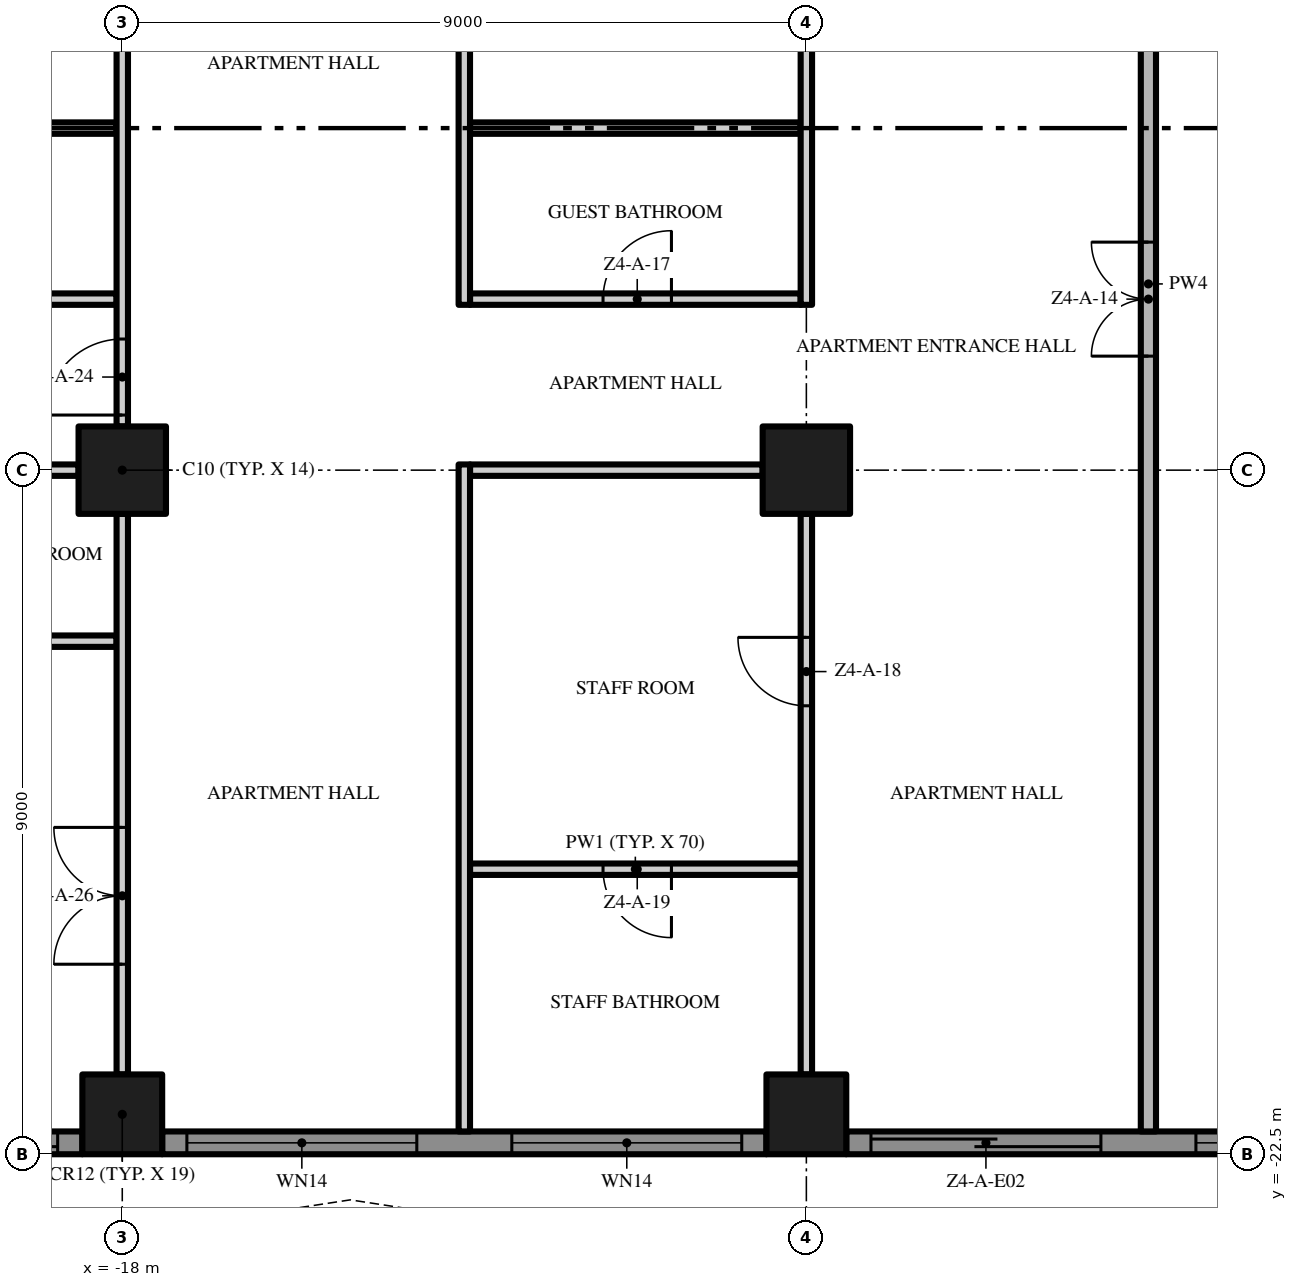
"""IFC4 building model, lengths in metres.
Left out: names, types, materials, properties, quantities, classifications, styles, units other than length and angle.
Written with IfcOpenShell. Run it as: python <this file> out.ifc"""

import sys

from ifc_helpers import new_model, si_unit, direction, frame, frame_2d, origin, origin_2d, place, context, subcontext, project, spatial, polyline, rectangle, outline, extrude, element, fill, save


model = new_model("IFC4")
c1 = context("Model", 3, precision=1e-05, world=origin(), true_north=direction((0.0, 1.0)))
c2 = subcontext(c1, "Body", "Model", "MODEL_VIEW")
j1 = project(units=[si_unit("LENGTHUNIT", "METRE"), si_unit("PLANEANGLEUNIT", "RADIAN")], contexts=[c1])
p1 = place(None, origin())
s1 = spatial("IfcSite", under=j1, at=p1, CompositionType="ELEMENT")
p2 = place(p1, origin())
s2 = spatial("IfcBuilding", under=s1, at=p2, CompositionType="ELEMENT")
p3 = place(p2, frame((0.0, 0.0, 188.2)))
s3 = spatial("IfcBuildingStorey", under=s2, at=p3, CompositionType="ELEMENT", Elevation=188.2)
p4 = place(p3, frame((-18.0, -13.5, 0.0), z_axis=(0.0, 0.0, 1.0), x_axis=(1.0, 0.0, 0.0)))
e1 = element("IfcColumn", 1, at=p4, inside=s3, PredefinedType="COLUMN", context=c2, shape_type="SweptSolid", body=[
    extrude(rectangle(XDim=1.15, YDim=1.15, at=origin_2d()), origin(), (0.0, 0.0, 1.0), 3.5),
])
p5 = place(p3, frame((-18.0, -21.975, 0.0), z_axis=(0.0, 0.0, 1.0), x_axis=(1.0, 0.0, 0.0)))
e2 = element("IfcColumn", 2, at=p5, inside=s3, PredefinedType="COLUMN", context=c2, shape_type="SweptSolid", body=[
    extrude(rectangle(XDim=1.05, YDim=1.05, at=origin_2d()), origin(), (0.0, 0.0, 1.0), 3.5),
])
p6 = place(p3, frame((-9.0, -13.5, 0.0), z_axis=(0.0, 0.0, 1.0), x_axis=(1.0, 0.0, 0.0)))
e3 = element("IfcColumn", 3, at=p6, inside=s3, PredefinedType="COLUMN", context=c2, shape_type="SweptSolid", body=[
    extrude(rectangle(XDim=1.15, YDim=1.15, at=origin_2d()), origin(), (0.0, 0.0, 1.0), 3.5),
])
p7 = place(p3, frame((-9.0, -21.975, 0.0), z_axis=(0.0, 0.0, 1.0), x_axis=(1.0, 0.0, 0.0)))
e4 = element("IfcColumn", 4, at=p7, inside=s3, PredefinedType="COLUMN", context=c2, shape_type="SweptSolid", body=[
    extrude(rectangle(XDim=1.05, YDim=1.05, at=origin_2d()), origin(), (0.0, 0.0, 1.0), 3.5),
])
p8 = place(p3, frame((-18.525, -22.35, 0.0), z_axis=(0.0, 0.0, 1.0), x_axis=(-1.0, 0.0, 0.0)))
e5 = element("IfcWall", 5, at=p8, inside=s3, PredefinedType="SOLIDWALL", context=c2, shape_type="SweptSolid", body=[
    extrude(rectangle(XDim=3.675, YDim=0.3, at=frame_2d((1.837, 0.0))), origin(), (0.0, 0.0, 1.0), 3.5),
])
p9 = place(p8, frame((0.325, 0.0, 0.0)))
e6 = element("IfcOpeningElement", 6, at=p9, cuts=e5, PredefinedType="OPENING", context=c2, shape_type="SweptSolid", body=[
    extrude(rectangle(XDim=3.025, YDim=2.4, at=frame_2d((1.512, 1.2))), frame((0.0, 0.16, 0.0), z_axis=(0.0, -1.0, 0.0), x_axis=(1.0, 0.0, 0.0)), (0.0, 0.0, 1.0), 0.32),
])
p10 = place(p3, frame((-9.525, -22.35, 0.0), z_axis=(0.0, 0.0, 1.0), x_axis=(-1.0, 0.0, 0.0)))
e7 = element("IfcWall", 7, at=p10, inside=s3, PredefinedType="SOLIDWALL", context=c2, shape_type="SweptSolid", body=[
    extrude(rectangle(XDim=7.95, YDim=0.3, at=frame_2d((3.975, 0.0))), origin(), (0.0, 0.0, 1.0), 3.5),
])
p11 = place(p10, frame((4.6, 0.0, 0.45)))
e8 = element("IfcOpeningElement", 8, at=p11, cuts=e7, PredefinedType="OPENING", context=c2, shape_type="SweptSolid", body=[
    extrude(rectangle(XDim=3.025, YDim=2.65, at=frame_2d((1.512, 1.325))), frame((0.0, 0.16, 0.0), z_axis=(0.0, -1.0, 0.0), x_axis=(1.0, 0.0, 0.0)), (0.0, 0.0, 1.0), 0.32),
])
p12 = place(p10, frame((0.325, 0.0, 0.45)))
e9 = element("IfcOpeningElement", 9, at=p12, cuts=e7, PredefinedType="OPENING", context=c2, shape_type="SweptSolid", body=[
    extrude(rectangle(XDim=3.025, YDim=2.65, at=frame_2d((1.512, 1.325))), frame((0.0, 0.16, 0.0), z_axis=(0.0, -1.0, 0.0), x_axis=(1.0, 0.0, 0.0)), (0.0, 0.0, 1.0), 0.32),
])
p13 = place(p3, frame((-0.525, -22.35, 0.0), z_axis=(0.0, 0.0, 1.0), x_axis=(-1.0, 0.0, 0.0)))
e10 = element("IfcWall", 10, at=p13, inside=s3, PredefinedType="SOLIDWALL", context=c2, shape_type="SweptSolid", body=[
    extrude(rectangle(XDim=7.95, YDim=0.3, at=frame_2d((3.975, 0.0))), origin(), (0.0, 0.0, 1.0), 3.5),
])
p14 = place(p13, frame((4.6, 0.0, 0.0)))
e11 = element("IfcOpeningElement", 11, at=p14, cuts=e10, PredefinedType="OPENING", context=c2, shape_type="SweptSolid", body=[
    extrude(rectangle(XDim=3.025, YDim=2.4, at=frame_2d((1.512, 1.2))), frame((0.0, 0.16, 0.0), z_axis=(0.0, -1.0, 0.0), x_axis=(1.0, 0.0, 0.0)), (0.0, 0.0, 1.0), 0.32),
])
p15 = place(p13, frame((0.325, 0.0, 0.45)))
e12 = element("IfcOpeningElement", 12, at=p15, cuts=e10, PredefinedType="OPENING", context=c2, shape_type="SweptSolid", body=[
    extrude(rectangle(XDim=3.025, YDim=2.65, at=frame_2d((1.512, 1.325))), frame((0.0, 0.16, 0.0), z_axis=(0.0, -1.0, 0.0), x_axis=(1.0, 0.0, 0.0)), (0.0, 0.0, 1.0), 0.32),
])
p16 = place(p3, origin())
e13 = element("IfcWall", 13, at=p16, inside=s3, PredefinedType="USERDEFINED", context=c2, shape_type="SweptSolid", body=[
    extrude(outline(polyline([(-22.5, -25.5), (-21.0, -25.271), (-19.5, -24.671), (-18.0, -23.929), (-16.5, -23.329), (-15.0, -23.1), (-13.5, -23.329), (-12.0, -23.929), (-10.5, -24.671), (-9.0, -25.271), (-7.5, -25.5), (-6.0, -25.271), (-4.5, -24.671), (-3.0, -23.929), (-1.5, -23.329), (0.0, -23.1), (1.5, -23.329), (3.0, -23.929), (4.5, -24.671), (6.0, -25.271), (7.5, -25.5), (9.0, -25.271), (10.5, -24.671), (12.0, -23.929), (13.5, -23.329), (15.0, -23.1), (16.5, -23.329), (18.0, -23.929), (19.5, -24.671), (21.0, -25.271), (22.5, -25.5), (22.538, -25.253), (21.066, -25.028), (19.602, -24.442), (18.102, -23.701), (16.566, -23.086), (15.0, -22.847), (13.434, -23.086), (11.898, -23.701), (10.398, -24.442), (8.934, -25.028), (7.5, -25.247), (6.066, -25.028), (4.602, -24.442), (3.102, -23.701), (1.566, -23.086), (0.0, -22.847), (-1.566, -23.086), (-3.102, -23.701), (-4.602, -24.442), (-6.066, -25.028), (-7.5, -25.247), (-8.934, -25.028), (-10.398, -24.442), (-11.898, -23.701), (-13.434, -23.086), (-15.0, -22.847), (-16.566, -23.086), (-18.102, -23.701), (-19.602, -24.442), (-21.066, -25.028), (-22.538, -25.253), (-22.5, -25.5)])), origin(), (0.0, 0.0, 1.0), 0.9),
])
p17 = place(p3, frame((-9.075, -18.75, 0.0), z_axis=(0.0, 0.0, 1.0), x_axis=(-1.0, 0.0, 0.0)))
e14 = element("IfcWall", 14, at=p17, inside=s3, PredefinedType="PARTITIONING", context=c2, shape_type="SweptSolid", body=[
    extrude(rectangle(XDim=4.35, YDim=0.15, at=frame_2d((2.175, 0.0))), origin(), (0.0, 0.0, 1.0), 3.5),
])
p18 = place(p17, frame((1.7, 0.0, 0.0)))
e15 = element("IfcOpeningElement", 15, at=p18, cuts=e14, PredefinedType="OPENING", context=c2, shape_type="SweptSolid", body=[
    extrude(rectangle(XDim=0.9, YDim=2.1, at=frame_2d((0.45, 1.05))), frame((0.0, 0.085, 0.0), z_axis=(0.0, -1.0, 0.0), x_axis=(1.0, 0.0, 0.0)), (0.0, 0.0, 1.0), 0.17),
])
p19 = place(p3, frame((-20.925, -15.75, 0.0), z_axis=(0.0, 0.0, 1.0), x_axis=(1.0, 0.0, 0.0)))
e16 = element("IfcWall", 16, at=p19, inside=s3, PredefinedType="PARTITIONING", context=c2, shape_type="SweptSolid", body=[
    extrude(rectangle(XDim=2.85, YDim=0.15, at=frame_2d((1.425, 0.0))), origin(), (0.0, 0.0, 1.0), 3.5),
])
p20 = place(p3, frame((-25.95, -13.5, 0.0), z_axis=(0.0, 0.0, 1.0), x_axis=(1.0, 0.0, 0.0)))
e17 = element("IfcWall", 17, at=p20, inside=s3, PredefinedType="PARTITIONING", context=c2, shape_type="SweptSolid", body=[
    extrude(rectangle(XDim=7.375, YDim=0.15, at=frame_2d((3.688, 0.0))), origin(), (0.0, 0.0, 1.0), 3.5),
])
p21 = place(p3, frame((-13.425, -13.5, 0.0), z_axis=(0.0, 0.0, 1.0), x_axis=(1.0, 0.0, 0.0)))
e18 = element("IfcWall", 18, at=p21, inside=s3, PredefinedType="PARTITIONING", context=c2, shape_type="SweptSolid", body=[
    extrude(rectangle(XDim=3.85, YDim=0.15, at=frame_2d((1.925, 0.0))), origin(), (0.0, 0.0, 1.0), 3.5),
])
p22 = place(p3, frame((-20.925, -11.25, 0.0), z_axis=(0.0, 0.0, 1.0), x_axis=(1.0, 0.0, 0.0)))
e19 = element("IfcWall", 19, at=p22, inside=s3, PredefinedType="PARTITIONING", context=c2, shape_type="SweptSolid", body=[
    extrude(rectangle(XDim=2.85, YDim=0.15, at=frame_2d((1.425, 0.0))), origin(), (0.0, 0.0, 1.0), 3.5),
])
p23 = place(p3, frame((-13.425, -11.25, 0.0), z_axis=(0.0, 0.0, 1.0), x_axis=(1.0, 0.0, 0.0)))
e20 = element("IfcWall", 20, at=p23, inside=s3, PredefinedType="PARTITIONING", context=c2, shape_type="SweptSolid", body=[
    extrude(rectangle(XDim=4.35, YDim=0.15, at=frame_2d((2.175, 0.0))), origin(), (0.0, 0.0, 1.0), 3.5),
])
p24 = place(p23, frame((1.75, 0.0, 0.0)))
e21 = element("IfcOpeningElement", 21, at=p24, cuts=e20, PredefinedType="OPENING", context=c2, shape_type="SweptSolid", body=[
    extrude(rectangle(XDim=0.9, YDim=2.1, at=frame_2d((0.45, 1.05))), frame((0.0, 0.085, 0.0), z_axis=(0.0, -1.0, 0.0), x_axis=(1.0, 0.0, 0.0)), (0.0, 0.0, 1.0), 0.17),
])
p25 = place(p3, frame((-20.925, -9.0, 0.0), z_axis=(0.0, 0.0, 1.0), x_axis=(1.0, 0.0, 0.0)))
e22 = element("IfcWall", 22, at=p25, inside=s3, PredefinedType="PARTITIONING", context=c2, shape_type="SweptSolid", body=[
    extrude(rectangle(XDim=2.85, YDim=0.15, at=frame_2d((1.425, 0.0))), origin(), (0.0, 0.0, 1.0), 3.5),
])
p26 = place(p3, frame((-13.425, -9.0, 0.0), z_axis=(0.0, 0.0, 1.0), x_axis=(1.0, 0.0, 0.0)))
e23 = element("IfcWall", 23, at=p26, inside=s3, PredefinedType="PARTITIONING", context=c2, shape_type="SweptSolid", body=[
    extrude(rectangle(XDim=4.35, YDim=0.15, at=frame_2d((2.175, 0.0))), origin(), (0.0, 0.0, 1.0), 3.5),
])
p27 = place(p3, frame((-18.0, -21.45, 0.0), z_axis=(0.0, 0.0, 1.0), x_axis=(0.0, 1.0, 0.0)))
e24 = element("IfcWall", 24, at=p27, inside=s3, PredefinedType="PARTITIONING", context=c2, shape_type="SweptSolid", body=[
    extrude(rectangle(XDim=7.375, YDim=0.15, at=frame_2d((3.688, 0.0))), origin(), (0.0, 0.0, 1.0), 3.5),
])
p28 = place(p27, frame((1.45, 0.0, 0.0)))
e25 = element("IfcOpeningElement", 25, at=p28, cuts=e24, PredefinedType="OPENING", context=c2, shape_type="SweptSolid", body=[
    extrude(rectangle(XDim=1.8, YDim=2.4, at=frame_2d((0.9, 1.2))), frame((0.0, 0.085, 0.0), z_axis=(0.0, -1.0, 0.0), x_axis=(1.0, 0.0, 0.0)), (0.0, 0.0, 1.0), 0.17),
])
p29 = place(p3, frame((-18.0, -12.925, 0.0), z_axis=(0.0, 0.0, 1.0), x_axis=(0.0, 1.0, 0.0)))
e26 = element("IfcWall", 26, at=p29, inside=s3, PredefinedType="PARTITIONING", context=c2, shape_type="SweptSolid", body=[
    extrude(rectangle(XDim=7.85, YDim=0.15, at=frame_2d((3.925, 0.0))), origin(), (0.0, 0.0, 1.0), 3.5),
])
p30 = place(p29, frame((6.7, 0.0, 0.0)))
e27 = element("IfcOpeningElement", 27, at=p30, cuts=e26, PredefinedType="OPENING", context=c2, shape_type="SweptSolid", body=[
    extrude(rectangle(XDim=1.0, YDim=2.4, at=frame_2d((0.5, 1.2))), frame((0.0, 0.085, 0.0), z_axis=(0.0, -1.0, 0.0), x_axis=(1.0, 0.0, 0.0)), (0.0, 0.0, 1.0), 0.17),
])
p31 = place(p29, frame((0.15, 0.0, 0.0)))
e28 = element("IfcOpeningElement", 28, at=p31, cuts=e26, PredefinedType="OPENING", context=c2, shape_type="SweptSolid", body=[
    extrude(rectangle(XDim=1.0, YDim=2.4, at=frame_2d((0.5, 1.2))), frame((0.0, 0.085, 0.0), z_axis=(0.0, -1.0, 0.0), x_axis=(1.0, 0.0, 0.0)), (0.0, 0.0, 1.0), 0.17),
])
p32 = place(p3, frame((-13.5, -22.2, 0.0), z_axis=(0.0, 0.0, 1.0), x_axis=(0.0, 1.0, 0.0)))
e29 = element("IfcWall", 29, at=p32, inside=s3, PredefinedType="PARTITIONING", context=c2, shape_type="SweptSolid", body=[
    extrude(rectangle(XDim=8.775, YDim=0.15, at=frame_2d((4.388, 0.0))), origin(), (0.0, 0.0, 1.0), 3.5),
])
p33 = place(p3, frame((-13.5, -11.325, 0.0), z_axis=(0.0, 0.0, 1.0), x_axis=(0.0, 1.0, 0.0)))
e30 = element("IfcWall", 30, at=p33, inside=s3, PredefinedType="PARTITIONING", context=c2, shape_type="SweptSolid", body=[
    extrude(rectangle(XDim=11.225, YDim=0.15, at=frame_2d((5.612, 0.0))), origin(), (0.0, 0.0, 1.0), 3.5),
])
p34 = place(p3, frame((-9.0, -21.45, 0.0), z_axis=(0.0, 0.0, 1.0), x_axis=(0.0, 1.0, 0.0)))
e31 = element("IfcWall", 31, at=p34, inside=s3, PredefinedType="PARTITIONING", context=c2, shape_type="SweptSolid", body=[
    extrude(rectangle(XDim=7.375, YDim=0.15, at=frame_2d((3.688, 0.0))), origin(), (0.0, 0.0, 1.0), 3.5),
])
p35 = place(p34, frame((4.85, 0.0, 0.0)))
e32 = element("IfcOpeningElement", 32, at=p35, cuts=e31, PredefinedType="OPENING", context=c2, shape_type="SweptSolid", body=[
    extrude(rectangle(XDim=0.9, YDim=2.1, at=frame_2d((0.45, 1.05))), frame((0.0, 0.085, 0.0), z_axis=(0.0, -1.0, 0.0), x_axis=(1.0, 0.0, 0.0)), (0.0, 0.0, 1.0), 0.17),
])
p36 = place(p3, frame((-9.0, -11.325, 0.0), z_axis=(0.0, 0.0, 1.0), x_axis=(0.0, 1.0, 0.0)))
e33 = element("IfcWall", 33, at=p36, inside=s3, PredefinedType="PARTITIONING", context=c2, shape_type="SweptSolid", body=[
    extrude(rectangle(XDim=6.25, YDim=0.15, at=frame_2d((3.125, 0.0))), origin(), (0.0, 0.0, 1.0), 3.5),
])
p37 = place(p36, frame((4.825, 0.0, 0.0)))
e34 = element("IfcOpeningElement", 34, at=p37, cuts=e33, PredefinedType="OPENING", context=c2, shape_type="SweptSolid", body=[
    extrude(rectangle(XDim=1.0, YDim=2.4, at=frame_2d((0.5, 1.2))), frame((0.0, 0.085, 0.0), z_axis=(0.0, -1.0, 0.0), x_axis=(1.0, 0.0, 0.0)), (0.0, 0.0, 1.0), 0.17),
])
p38 = place(p3, frame((-4.5, -22.2, 0.0), z_axis=(0.0, 0.0, 1.0), x_axis=(0.0, 1.0, 0.0)))
e35 = element("IfcWall", 35, at=p38, inside=s3, PredefinedType="PARTITIONING", context=c2, shape_type="SweptSolid", body=[
    extrude(rectangle(XDim=22.3, YDim=0.2, at=frame_2d((11.15, 0.0))), origin(), (0.0, 0.0, 1.0), 3.5),
])
p39 = place(p38, frame((10.2, 0.0, 0.0)))
e36 = element("IfcOpeningElement", 36, at=p39, cuts=e35, PredefinedType="OPENING", context=c2, shape_type="SweptSolid", body=[
    extrude(rectangle(XDim=1.5, YDim=2.4, at=frame_2d((0.75, 1.2))), frame((0.0, 0.11, 0.0), z_axis=(0.0, -1.0, 0.0), x_axis=(1.0, 0.0, 0.0)), (0.0, 0.0, 1.0), 0.22),
])
p40 = place(p9, origin())
e37 = element("IfcDoor", 37, at=p40, inside=s3, OperationType="SINGLE_SWING_LEFT", PredefinedType="DOOR", context=c2, shape_type="SweptSolid", body=[
    extrude(rectangle(XDim=3.025, YDim=2.4, at=frame_2d((1.512, 1.2))), frame((0.0, 0.025, 0.0), z_axis=(0.0, -1.0, 0.0), x_axis=(1.0, 0.0, 0.0)), (0.0, 0.0, 1.0), 0.05),
])
fill(e6, e37)
p41 = place(p11, origin())
e38 = element("IfcWindow", 38, at=p41, inside=s3, PartitioningType="SINGLE_PANEL", PredefinedType="WINDOW", context=c2, shape_type="SweptSolid", body=[
    extrude(rectangle(XDim=3.025, YDim=2.65, at=frame_2d((1.512, 1.325))), frame((0.0, 0.03, 0.0), z_axis=(0.0, -1.0, 0.0), x_axis=(1.0, 0.0, 0.0)), (0.0, 0.0, 1.0), 0.06),
])
fill(e8, e38)
p42 = place(p12, origin())
e39 = element("IfcWindow", 39, at=p42, inside=s3, PartitioningType="SINGLE_PANEL", PredefinedType="WINDOW", context=c2, shape_type="SweptSolid", body=[
    extrude(rectangle(XDim=3.025, YDim=2.65, at=frame_2d((1.512, 1.325))), frame((0.0, 0.03, 0.0), z_axis=(0.0, -1.0, 0.0), x_axis=(1.0, 0.0, 0.0)), (0.0, 0.0, 1.0), 0.06),
])
fill(e9, e39)
p43 = place(p14, origin())
e40 = element("IfcDoor", 40, at=p43, inside=s3, OperationType="SINGLE_SWING_LEFT", PredefinedType="DOOR", context=c2, shape_type="SweptSolid", body=[
    extrude(rectangle(XDim=3.025, YDim=2.4, at=frame_2d((1.512, 1.2))), frame((0.0, 0.025, 0.0), z_axis=(0.0, -1.0, 0.0), x_axis=(1.0, 0.0, 0.0)), (0.0, 0.0, 1.0), 0.05),
])
fill(e11, e40)
p44 = place(p15, origin())
e41 = element("IfcWindow", 41, at=p44, inside=s3, PartitioningType="SINGLE_PANEL", PredefinedType="WINDOW", context=c2, shape_type="SweptSolid", body=[
    extrude(rectangle(XDim=3.025, YDim=2.65, at=frame_2d((1.512, 1.325))), frame((0.0, 0.03, 0.0), z_axis=(0.0, -1.0, 0.0), x_axis=(1.0, 0.0, 0.0)), (0.0, 0.0, 1.0), 0.06),
])
fill(e12, e41)
p45 = place(p39, origin())
e42 = element("IfcDoor", 42, at=p45, inside=s3, OperationType="DOUBLE_DOOR_SINGLE_SWING", PredefinedType="DOOR", context=c2, shape_type="SweptSolid", body=[
    extrude(rectangle(XDim=1.5, YDim=2.4, at=frame_2d((0.75, 1.2))), frame((0.0, 0.025, 0.0), z_axis=(0.0, -1.0, 0.0), x_axis=(1.0, 0.0, 0.0)), (0.0, 0.0, 1.0), 0.05),
])
fill(e36, e42)
p46 = place(p24, origin())
e43 = element("IfcDoor", 43, at=p46, inside=s3, OperationType="SINGLE_SWING_RIGHT", PredefinedType="DOOR", context=c2, shape_type="SweptSolid", body=[
    extrude(rectangle(XDim=0.9, YDim=2.1, at=frame_2d((0.45, 1.05))), frame((0.0, 0.025, 0.0), z_axis=(0.0, -1.0, 0.0), x_axis=(1.0, 0.0, 0.0)), (0.0, 0.0, 1.0), 0.05),
])
fill(e21, e43)
p47 = place(p35, origin())
e44 = element("IfcDoor", 44, at=p47, inside=s3, OperationType="SINGLE_SWING_RIGHT", PredefinedType="DOOR", context=c2, shape_type="SweptSolid", body=[
    extrude(rectangle(XDim=0.9, YDim=2.1, at=frame_2d((0.45, 1.05))), frame((0.0, 0.025, 0.0), z_axis=(0.0, -1.0, 0.0), x_axis=(1.0, 0.0, 0.0)), (0.0, 0.0, 1.0), 0.05),
])
fill(e32, e44)
p48 = place(p18, origin())
e45 = element("IfcDoor", 45, at=p48, inside=s3, OperationType="SINGLE_SWING_LEFT", PredefinedType="DOOR", context=c2, shape_type="SweptSolid", body=[
    extrude(rectangle(XDim=0.9, YDim=2.1, at=frame_2d((0.45, 1.05))), frame((0.0, 0.025, 0.0), z_axis=(0.0, -1.0, 0.0), x_axis=(1.0, 0.0, 0.0)), (0.0, 0.0, 1.0), 0.05),
])
fill(e15, e45)
p49 = place(p31, origin())
e46 = element("IfcDoor", 46, at=p49, inside=s3, OperationType="SINGLE_SWING_LEFT", PredefinedType="DOOR", context=c2, shape_type="SweptSolid", body=[
    extrude(rectangle(XDim=1.0, YDim=2.4, at=frame_2d((0.5, 1.2))), frame((0.0, 0.025, 0.0), z_axis=(0.0, -1.0, 0.0), x_axis=(1.0, 0.0, 0.0)), (0.0, 0.0, 1.0), 0.05),
])
fill(e28, e46)
p50 = place(p28, origin())
e47 = element("IfcDoor", 47, at=p50, inside=s3, OperationType="DOUBLE_DOOR_SINGLE_SWING", PredefinedType="DOOR", context=c2, shape_type="SweptSolid", body=[
    extrude(rectangle(XDim=1.8, YDim=2.4, at=frame_2d((0.9, 1.2))), frame((0.0, 0.025, 0.0), z_axis=(0.0, -1.0, 0.0), x_axis=(1.0, 0.0, 0.0)), (0.0, 0.0, 1.0), 0.05),
])
fill(e25, e47)
save(model, sys.argv[1])
